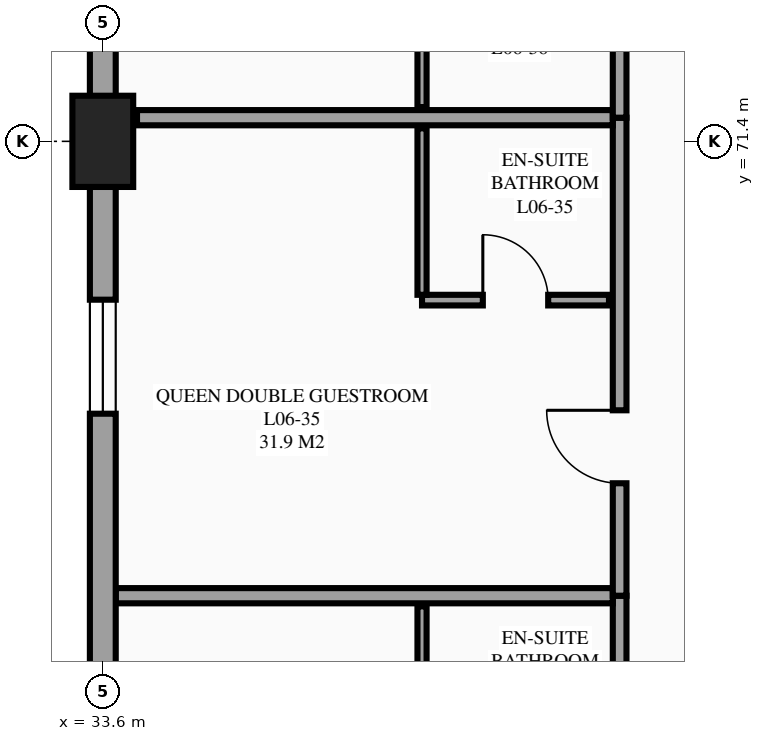
"""IFC4 building model, lengths in metres.
Left out: names, types, materials, properties, quantities, classifications, styles, units other than length and angle.
Written with IfcOpenShell. Run it as: python <this file> out.ifc"""

import sys

from ifc_helpers import new_model, si_unit, direction, frame, frame_2d, origin, origin_2d, place, context, subcontext, project, spatial, rectangle, extrude, element, fill, save


model = new_model("IFC4")
c1 = context("Model", 3, precision=1e-05, world=origin(), true_north=direction((0.0, 1.0)))
c2 = subcontext(c1, "Body", "Model", "MODEL_VIEW")
j1 = project(units=[si_unit("LENGTHUNIT", "METRE"), si_unit("PLANEANGLEUNIT", "RADIAN")], contexts=[c1])
p1 = place(None, origin())
s1 = spatial("IfcSite", under=j1, at=p1, CompositionType="ELEMENT")
p2 = place(p1, origin())
s2 = spatial("IfcBuilding", under=s1, at=p2, CompositionType="ELEMENT")
p3 = place(p2, frame((0.0, 0.0, 25.5)))
s3 = spatial("IfcBuildingStorey", under=s2, at=p3, CompositionType="ELEMENT", Elevation=25.5)
p4 = place(p3, frame((33.6, 71.4, 0.0), z_axis=(0.0, 0.0, 1.0), x_axis=(1.0, 0.0, 0.0)))
e1 = element("IfcColumn", 1, at=p4, inside=s3, PredefinedType="COLUMN", context=c2, shape_type="SweptSolid", body=[
    extrude(rectangle(XDim=0.8, YDim=1.2, at=origin_2d()), origin(), (0.0, 0.0, 1.0), 3.6),
])
p5 = place(p3, frame((40.4, 59.133, 0.0), z_axis=(0.0, 0.0, 1.0), x_axis=(0.0, 1.0, 0.0)))
e2 = element("IfcWall", 2, at=p5, inside=s3, PredefinedType="PARTITIONING", context=c2, shape_type="SweptSolid", body=[
    extrude(rectangle(XDim=6.289, YDim=0.18, at=frame_2d((3.145, 0.0))), origin(), (0.0, 0.0, 1.0), 3.375),
])
p6 = place(p5, frame((1.479, 0.0, 0.0)))
e3 = element("IfcOpeningElement", 3, at=p6, cuts=e2, PredefinedType="OPENING", context=c2, shape_type="SweptSolid", body=[
    extrude(rectangle(XDim=0.96, YDim=2.15, at=frame_2d((0.48, 1.075))), frame((0.0, 0.1, 0.0), z_axis=(0.0, -1.0, 0.0), x_axis=(1.0, 0.0, 0.0)), (0.0, 0.0, 1.0), 0.2),
])
p7 = place(p3, frame((33.77, 65.422, 0.0), z_axis=(0.0, 0.0, 1.0), x_axis=(1.0, 0.0, 0.0)))
e4 = element("IfcWall", 4, at=p7, inside=s3, PredefinedType="PARTITIONING", context=c2, shape_type="SweptSolid", body=[
    extrude(rectangle(XDim=6.54, YDim=0.2, at=frame_2d((3.27, 0.0))), origin(), (0.0, 0.0, 1.0), 3.375),
])
p8 = place(p3, frame((37.8, 63.092, 0.0), z_axis=(0.0, 0.0, 1.0), x_axis=(0.0, 1.0, 0.0)))
e5 = element("IfcWall", 5, at=p8, inside=s3, PredefinedType="PARTITIONING", context=c2, shape_type="SweptSolid", body=[
    extrude(rectangle(XDim=2.19, YDim=0.12, at=frame_2d((1.095, 0.0))), origin(), (0.0, 0.0, 1.0), 3.375),
])
p9 = place(p3, frame((40.4, 65.422, 0.0), z_axis=(0.0, 0.0, 1.0), x_axis=(0.0, 1.0, 0.0)))
e6 = element("IfcWall", 6, at=p9, inside=s3, PredefinedType="PARTITIONING", context=c2, shape_type="SweptSolid", body=[
    extrude(rectangle(XDim=6.289, YDim=0.18, at=frame_2d((3.145, 0.0))), origin(), (0.0, 0.0, 1.0), 3.375),
])
p10 = place(p9, frame((1.479, 0.0, 0.0)))
e7 = element("IfcOpeningElement", 7, at=p10, cuts=e6, PredefinedType="OPENING", context=c2, shape_type="SweptSolid", body=[
    extrude(rectangle(XDim=0.96, YDim=2.15, at=frame_2d((0.48, 1.075))), frame((0.0, 0.1, 0.0), z_axis=(0.0, -1.0, 0.0), x_axis=(1.0, 0.0, 0.0)), (0.0, 0.0, 1.0), 0.2),
])
p11 = place(p3, frame((34.05, 71.711, 0.0), z_axis=(0.0, 0.0, 1.0), x_axis=(1.0, 0.0, 0.0)))
e8 = element("IfcWall", 8, at=p11, inside=s3, PredefinedType="PARTITIONING", context=c2, shape_type="SweptSolid", body=[
    extrude(rectangle(XDim=6.26, YDim=0.2, at=frame_2d((3.13, 0.0))), origin(), (0.0, 0.0, 1.0), 3.375),
])
p12 = place(p3, frame((37.8, 69.311, 0.0), z_axis=(0.0, 0.0, 1.0), x_axis=(1.0, 0.0, 0.0)))
e9 = element("IfcWall", 9, at=p12, inside=s3, PredefinedType="PARTITIONING", context=c2, shape_type="SweptSolid", body=[
    extrude(rectangle(XDim=2.46, YDim=0.14, at=frame_2d((1.23, 0.0))), origin(), (0.0, 0.0, 1.0), 3.375),
])
p13 = place(p12, frame((0.8, 0.0, 0.0)))
e10 = element("IfcOpeningElement", 10, at=p13, cuts=e9, PredefinedType="OPENING", context=c2, shape_type="SweptSolid", body=[
    extrude(rectangle(XDim=0.86, YDim=2.1, at=frame_2d((0.43, 1.05))), frame((0.0, 0.08, 0.0), z_axis=(0.0, -1.0, 0.0), x_axis=(1.0, 0.0, 0.0)), (0.0, 0.0, 1.0), 0.16),
])
p14 = place(p3, frame((37.8, 69.381, 0.0), z_axis=(0.0, 0.0, 1.0), x_axis=(0.0, 1.0, 0.0)))
e11 = element("IfcWall", 11, at=p14, inside=s3, PredefinedType="PARTITIONING", context=c2, shape_type="SweptSolid", body=[
    extrude(rectangle(XDim=2.19, YDim=0.12, at=frame_2d((1.095, 0.0))), origin(), (0.0, 0.0, 1.0), 3.375),
])
p15 = place(p3, frame((40.4, 71.711, 0.0), z_axis=(0.0, 0.0, 1.0), x_axis=(0.0, 1.0, 0.0)))
e12 = element("IfcWall", 12, at=p15, inside=s3, PredefinedType="PARTITIONING", context=c2, shape_type="SweptSolid", body=[
    extrude(rectangle(XDim=6.289, YDim=0.18, at=frame_2d((3.145, 0.0))), origin(), (0.0, 0.0, 1.0), 3.375),
])
p16 = place(p15, frame((3.849, 0.0, 0.0)))
e13 = element("IfcOpeningElement", 13, at=p16, cuts=e12, PredefinedType="OPENING", context=c2, shape_type="SweptSolid", body=[
    extrude(rectangle(XDim=0.96, YDim=2.15, at=frame_2d((0.48, 1.075))), frame((0.0, 0.1, 0.0), z_axis=(0.0, -1.0, 0.0), x_axis=(1.0, 0.0, 0.0)), (0.0, 0.0, 1.0), 0.2),
])
p17 = place(p3, frame((37.8, 71.851, 0.0), z_axis=(0.0, 0.0, 1.0), x_axis=(0.0, 1.0, 0.0)))
e14 = element("IfcWall", 14, at=p17, inside=s3, PredefinedType="PARTITIONING", context=c2, shape_type="SweptSolid", body=[
    extrude(rectangle(XDim=2.19, YDim=0.12, at=frame_2d((1.095, 0.0))), origin(), (0.0, 0.0, 1.0), 3.375),
])
p18 = place(p3, frame((33.6, 79.8, 0.0), z_axis=(0.0, 0.0, 1.0), x_axis=(0.0, -1.0, 0.0)))
e15 = element("IfcWall", 15, at=p18, inside=s3, PredefinedType="STANDARD", context=c2, shape_type="SweptSolid", body=[
    extrude(rectangle(XDim=8.4, YDim=0.34, at=frame_2d((4.2, 0.0))), origin(), (0.0, 0.0, 1.0), 3.075),
])
p19 = place(p18, frame((4.195, 0.0, 0.85)))
e16 = element("IfcOpeningElement", 16, at=p19, cuts=e15, PredefinedType="OPENING", context=c2, shape_type="SweptSolid", body=[
    extrude(rectangle(XDim=1.5, YDim=1.5, at=frame_2d((0.75, 0.75))), frame((0.0, 0.18, 0.0), z_axis=(0.0, -1.0, 0.0), x_axis=(1.0, 0.0, 0.0)), (0.0, 0.0, 1.0), 0.36),
])
p20 = place(p3, frame((33.6, 71.4, 0.0), z_axis=(0.0, 0.0, 1.0), x_axis=(0.0, -1.0, 0.0)))
e17 = element("IfcWall", 17, at=p20, inside=s3, PredefinedType="STANDARD", context=c2, shape_type="SweptSolid", body=[
    extrude(rectangle(XDim=8.4, YDim=0.34, at=frame_2d((4.2, 0.0))), origin(), (0.0, 0.0, 1.0), 2.73),
])
p21 = place(p20, frame((2.083, 0.0, 0.85)))
e18 = element("IfcOpeningElement", 18, at=p21, cuts=e17, PredefinedType="OPENING", context=c2, shape_type="SweptSolid", body=[
    extrude(rectangle(XDim=1.5, YDim=1.5, at=frame_2d((0.75, 0.75))), frame((0.0, 0.18, 0.0), z_axis=(0.0, -1.0, 0.0), x_axis=(1.0, 0.0, 0.0)), (0.0, 0.0, 1.0), 0.36),
])
p22 = place(p21, origin())
e19 = element("IfcWindow", 19, at=p22, inside=s3, PartitioningType="SINGLE_PANEL", PredefinedType="WINDOW", context=c2, shape_type="SweptSolid", body=[
    extrude(rectangle(XDim=1.5, YDim=1.5, at=frame_2d((0.75, 0.75))), frame((0.0, 0.03, 0.0), z_axis=(0.0, -1.0, 0.0), x_axis=(1.0, 0.0, 0.0)), (0.0, 0.0, 1.0), 0.06),
])
fill(e18, e19)
p23 = place(p10, origin())
e20 = element("IfcDoor", 20, at=p23, inside=s3, OperationType="SINGLE_SWING_RIGHT", PredefinedType="DOOR", context=c2, shape_type="SweptSolid", body=[
    extrude(rectangle(XDim=0.96, YDim=2.15, at=frame_2d((0.48, 1.075))), frame((0.0, 0.025, 0.0), z_axis=(0.0, -1.0, 0.0), x_axis=(1.0, 0.0, 0.0)), (0.0, 0.0, 1.0), 0.05),
])
fill(e7, e20)
p24 = place(p13, origin())
e21 = element("IfcDoor", 21, at=p24, inside=s3, OperationType="SINGLE_SWING_LEFT", PredefinedType="DOOR", context=c2, shape_type="SweptSolid", body=[
    extrude(rectangle(XDim=0.86, YDim=2.1, at=frame_2d((0.43, 1.05))), frame((0.0, 0.025, 0.0), z_axis=(0.0, -1.0, 0.0), x_axis=(1.0, 0.0, 0.0)), (0.0, 0.0, 1.0), 0.05),
])
fill(e10, e21)
save(model, sys.argv[1])
